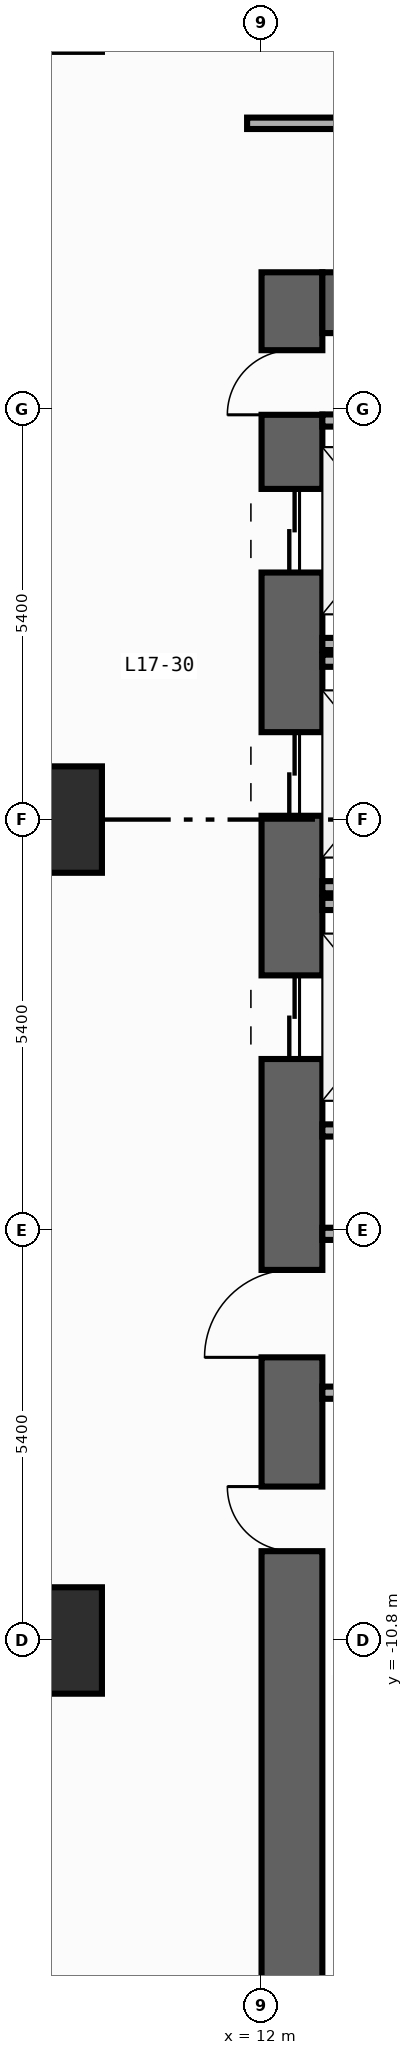
"""IFC4 building model, lengths in metres.
Left out: names, types, materials, properties, quantities, classifications, styles, units other than length and angle.
Written with IfcOpenShell. Run it as: python <this file> out.ifc"""

import sys

from ifc_helpers import new_model, si_unit, direction, frame, frame_2d, origin, origin_2d, place, context, subcontext, project, spatial, rectangle, extrude, element, fill, save


model = new_model("IFC4")
c1 = context("Model", 3, precision=1e-05, world=origin(), true_north=direction((0.0, 1.0)))
c2 = subcontext(c1, "Body", "Model", "MODEL_VIEW")
j1 = project(units=[si_unit("LENGTHUNIT", "METRE"), si_unit("PLANEANGLEUNIT", "RADIAN")], contexts=[c1])
p1 = place(None, origin())
s1 = spatial("IfcSite", under=j1, at=p1, CompositionType="ELEMENT")
p2 = place(p1, origin())
s2 = spatial("IfcBuilding", under=s1, at=p2, CompositionType="ELEMENT")
p3 = place(p2, frame((0.0, 0.0, 72.2)))
s3 = spatial("IfcBuildingStorey", under=s2, at=p3, CompositionType="ELEMENT", Elevation=72.2)
p4 = place(p3, frame((12.4, -19.8, 0.0), z_axis=(0.0, 0.0, 1.0), x_axis=(0.0, 1.0, 0.0)))
e1 = element("IfcWall", 1, at=p4, inside=s3, PredefinedType="SHEAR", context=c2, shape_type="SweptSolid", body=[
    extrude(rectangle(XDim=27.0, YDim=0.8, at=frame_2d((13.5, 0.0))), origin(), (0.0, 0.0, 1.0), 3.94),
])
p5 = place(p4, frame((23.05, 0.0, 0.0)))
e2 = element("IfcOpeningElement", 2, at=p5, cuts=e1, PredefinedType="OPENING", context=c2, shape_type="SweptSolid", body=[
    extrude(rectangle(XDim=1.1, YDim=2.2, at=frame_2d((0.55, 1.1))), frame((0.0, 0.41, 0.0), z_axis=(0.0, -1.0, 0.0), x_axis=(1.0, 0.0, 0.0)), (0.0, 0.0, 1.0), 0.82),
])
p6 = place(p4, frame((19.85, 0.0, 0.0)))
e3 = element("IfcOpeningElement", 3, at=p6, cuts=e1, PredefinedType="OPENING", context=c2, shape_type="SweptSolid", body=[
    extrude(rectangle(XDim=1.1, YDim=2.2, at=frame_2d((0.55, 1.1))), frame((0.0, 0.41, 0.0), z_axis=(0.0, -1.0, 0.0), x_axis=(1.0, 0.0, 0.0)), (0.0, 0.0, 1.0), 0.82),
])
p7 = place(p4, frame((16.65, 0.0, 0.0)))
e4 = element("IfcOpeningElement", 4, at=p7, cuts=e1, PredefinedType="OPENING", context=c2, shape_type="SweptSolid", body=[
    extrude(rectangle(XDim=1.1, YDim=2.2, at=frame_2d((0.55, 1.1))), frame((0.0, 0.41, 0.0), z_axis=(0.0, -1.0, 0.0), x_axis=(1.0, 0.0, 0.0)), (0.0, 0.0, 1.0), 0.82),
])
p8 = place(p4, frame((10.175, 0.0, 0.0)))
e5 = element("IfcOpeningElement", 5, at=p8, cuts=e1, PredefinedType="OPENING", context=c2, shape_type="SweptSolid", body=[
    extrude(rectangle(XDim=0.85, YDim=2.1, at=frame_2d((0.425, 1.05))), frame((0.0, 0.41, 0.0), z_axis=(0.0, -1.0, 0.0), x_axis=(1.0, 0.0, 0.0)), (0.0, 0.0, 1.0), 0.82),
])
p9 = place(p4, frame((12.725, 0.0, 0.0)))
e6 = element("IfcOpeningElement", 6, at=p9, cuts=e1, PredefinedType="OPENING", context=c2, shape_type="SweptSolid", body=[
    extrude(rectangle(XDim=1.15, YDim=2.2, at=frame_2d((0.575, 1.1))), frame((0.0, 0.41, 0.0), z_axis=(0.0, -1.0, 0.0), x_axis=(1.0, 0.0, 0.0)), (0.0, 0.0, 1.0), 0.82),
])
p10 = place(p4, frame((25.125, 0.0, 0.0)))
e7 = element("IfcOpeningElement", 7, at=p10, cuts=e1, PredefinedType="OPENING", context=c2, shape_type="SweptSolid", body=[
    extrude(rectangle(XDim=0.85, YDim=2.1, at=frame_2d((0.425, 1.05))), frame((0.0, 0.41, 0.0), z_axis=(0.0, -1.0, 0.0), x_axis=(1.0, 0.0, 0.0)), (0.0, 0.0, 1.0), 0.82),
])
p11 = place(p3, frame((12.8, 6.8, 0.0), z_axis=(0.0, 0.0, 1.0), x_axis=(1.0, 0.0, 0.0)))
e8 = element("IfcWall", 8, at=p11, inside=s3, PredefinedType="SHEAR", context=c2, shape_type="SweptSolid", body=[
    extrude(rectangle(XDim=6.8, YDim=0.8, at=frame_2d((3.4, 0.0))), origin(), (0.0, 0.0, 1.0), 3.94),
])
for number, where, z_axis, x_axis in (
    (9, (9.2, -10.8, 0.0), (0.0, 0.0, 1.0), (1.0, 0.0, 0.0)),
    (10, (9.2, 0.0, 0.0), (0.0, 0.0, 1.0), (1.0, 0.0, 0.0)),
):
    element("IfcColumn", number, at=place(p3, frame(where, z_axis=z_axis, x_axis=x_axis)), inside=s3, PredefinedType="COLUMN", context=c2, shape_type="SweptSolid", body=[
        extrude(rectangle(XDim=1.4, YDim=1.4, at=origin_2d()), origin(), (0.0, 0.0, 1.0), 4.2),
    ])
for number, where, z_axis, x_axis in (
    (11, (12.8, 2.31, 0.0), (0.0, 0.0, 1.0), (1.0, 0.0, 0.0)),
    (12, (12.8, -0.89, 0.0), (0.0, 0.0, 1.0), (1.0, 0.0, 0.0)),
    (13, (12.8, 2.09, 0.0), (0.0, 0.0, 1.0), (1.0, 0.0, 0.0)),
    (14, (12.8, -4.09, 0.0), (0.0, 0.0, 1.0), (1.0, 0.0, 0.0)),
    (15, (12.8, -1.11, 0.0), (0.0, 0.0, 1.0), (1.0, 0.0, 0.0)),
):
    element("IfcWall", number, at=place(p3, frame(where, z_axis=z_axis, x_axis=x_axis)), inside=s3, PredefinedType="STANDARD", context=c2, shape_type="SweptSolid", body=[
        extrude(rectangle(XDim=2.19, YDim=0.16, at=frame_2d((1.095, 0.0))), origin(), (0.0, 0.0, 1.0), 3.94),
    ])
for number, where, z_axis, x_axis in (
    (16, (12.8, -5.45, 0.0), (0.0, 0.0, 1.0), (1.0, 0.0, 0.0)),
    (17, (12.8, -7.54, 0.0), (0.0, 0.0, 1.0), (1.0, 0.0, 0.0)),
    (18, (12.8, 5.25, 0.0), (0.0, 0.0, 1.0), (1.0, 0.0, 0.0)),
):
    element("IfcWall", number, at=place(p3, frame(where, z_axis=z_axis, x_axis=x_axis)), inside=s3, PredefinedType="STANDARD", context=c2, shape_type="SweptSolid", body=[
        extrude(rectangle(XDim=2.6, YDim=0.16, at=frame_2d((1.3, 0.0))), origin(), (0.0, 0.0, 1.0), 3.94),
    ])
p12 = place(p3, frame((11.81, 9.16, 0.0), z_axis=(0.0, 0.0, 1.0), x_axis=(1.0, 0.0, 0.0)))
e19 = element("IfcWall", 19, at=p12, inside=s3, PredefinedType="PARTITIONING", context=c2, shape_type="SweptSolid", body=[
    extrude(rectangle(XDim=8.83, YDim=0.15, at=frame_2d((4.415, 0.0))), origin(), (0.0, 0.0, 1.0), 3.94),
])
p13 = place(p12, frame((5.067, 0.0, 0.0)))
e20 = element("IfcOpeningElement", 20, at=p13, cuts=e19, PredefinedType="OPENING", context=c2, shape_type="SweptSolid", body=[
    extrude(rectangle(XDim=0.9, YDim=2.15, at=frame_2d((0.45, 1.075))), frame((0.0, 0.085, 0.0), z_axis=(0.0, -1.0, 0.0), x_axis=(1.0, 0.0, 0.0)), (0.0, 0.0, 1.0), 0.17),
])
p14 = place(p5, origin())
e21 = element("IfcDoor", 21, at=p14, inside=s3, OperationType="DOUBLE_DOOR_SLIDING", PredefinedType="DOOR", context=c2, shape_type="SweptSolid", body=[
    extrude(rectangle(XDim=1.1, YDim=2.2, at=frame_2d((0.55, 1.1))), frame((0.0, 0.025, 0.0), z_axis=(0.0, -1.0, 0.0), x_axis=(1.0, 0.0, 0.0)), (0.0, 0.0, 1.0), 0.05),
])
fill(e2, e21)
p15 = place(p6, origin())
e22 = element("IfcDoor", 22, at=p15, inside=s3, OperationType="DOUBLE_DOOR_SLIDING", PredefinedType="DOOR", context=c2, shape_type="SweptSolid", body=[
    extrude(rectangle(XDim=1.1, YDim=2.2, at=frame_2d((0.55, 1.1))), frame((0.0, 0.025, 0.0), z_axis=(0.0, -1.0, 0.0), x_axis=(1.0, 0.0, 0.0)), (0.0, 0.0, 1.0), 0.05),
])
fill(e3, e22)
p16 = place(p7, origin())
e23 = element("IfcDoor", 23, at=p16, inside=s3, OperationType="DOUBLE_DOOR_SLIDING", PredefinedType="DOOR", context=c2, shape_type="SweptSolid", body=[
    extrude(rectangle(XDim=1.1, YDim=2.2, at=frame_2d((0.55, 1.1))), frame((0.0, 0.025, 0.0), z_axis=(0.0, -1.0, 0.0), x_axis=(1.0, 0.0, 0.0)), (0.0, 0.0, 1.0), 0.05),
])
fill(e4, e23)
p17 = place(p8, origin())
e24 = element("IfcDoor", 24, at=p17, inside=s3, OperationType="SINGLE_SWING_RIGHT", PredefinedType="DOOR", context=c2, shape_type="SweptSolid", body=[
    extrude(rectangle(XDim=0.85, YDim=2.1, at=frame_2d((0.425, 1.05))), frame((0.0, 0.025, 0.0), z_axis=(0.0, -1.0, 0.0), x_axis=(1.0, 0.0, 0.0)), (0.0, 0.0, 1.0), 0.05),
])
fill(e5, e24)
p18 = place(p9, origin())
e25 = element("IfcDoor", 25, at=p18, inside=s3, OperationType="SINGLE_SWING_LEFT", PredefinedType="DOOR", context=c2, shape_type="SweptSolid", body=[
    extrude(rectangle(XDim=1.15, YDim=2.2, at=frame_2d((0.575, 1.1))), frame((0.0, 0.025, 0.0), z_axis=(0.0, -1.0, 0.0), x_axis=(1.0, 0.0, 0.0)), (0.0, 0.0, 1.0), 0.05),
])
fill(e6, e25)
p19 = place(p10, origin())
e26 = element("IfcDoor", 26, at=p19, inside=s3, OperationType="SINGLE_SWING_LEFT", PredefinedType="DOOR", context=c2, shape_type="SweptSolid", body=[
    extrude(rectangle(XDim=0.85, YDim=2.1, at=frame_2d((0.425, 1.05))), frame((0.0, 0.025, 0.0), z_axis=(0.0, -1.0, 0.0), x_axis=(1.0, 0.0, 0.0)), (0.0, 0.0, 1.0), 0.05),
])
fill(e7, e26)
save(model, sys.argv[1])
